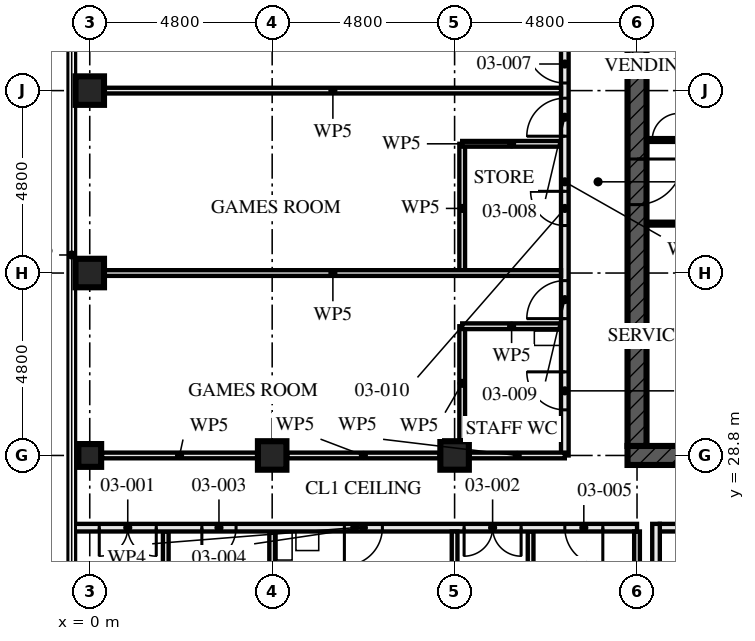
"""IFC4 building model, lengths in metres.
Left out: names, types, materials, properties, quantities, classifications, styles, units other than length and angle.
Written with IfcOpenShell. Run it as: python <this file> out.ifc"""

import sys

from ifc_helpers import new_model, si_unit, direction, frame, frame_2d, origin, origin_2d, place, context, subcontext, project, spatial, rectangle, hollow_rectangle, extrude, element, fill, save


model = new_model("IFC4")
c1 = context("Model", 3, precision=1e-05, world=origin(), true_north=direction((0.0, 1.0)))
c2 = subcontext(c1, "Body", "Model", "MODEL_VIEW")
j1 = project(units=[si_unit("LENGTHUNIT", "METRE"), si_unit("PLANEANGLEUNIT", "RADIAN")], contexts=[c1])
p1 = place(None, origin())
s1 = spatial("IfcSite", under=j1, at=p1, CompositionType="ELEMENT")
p2 = place(p1, origin())
s2 = spatial("IfcBuilding", under=s1, at=p2, CompositionType="ELEMENT")
p3 = place(p2, frame((0.0, 0.0, 13.5)))
s3 = spatial("IfcBuildingStorey", under=s2, at=p3, CompositionType="ELEMENT", Elevation=13.5)
p4 = place(p3, frame((0.0, 28.8, 0.0), z_axis=(0.0, 0.0, 1.0), x_axis=(0.0, 1.0, 0.0)))
e1 = element("IfcColumn", 1, at=p4, inside=s3, PredefinedType="COLUMN", context=c2, shape_type="SweptSolid", body=[
    extrude(hollow_rectangle(XDim=0.6, YDim=0.6, WallThickness=0.08, at=origin_2d()), origin(), (0.0, 0.0, 1.0), 4.5),
])
for number, where, z_axis, x_axis in (
    (2, (0.0, 33.6, 0.0), (0.0, 0.0, 1.0), (1.0, 0.0, 0.0)),
    (3, (0.0, 38.4, 0.0), (0.0, 0.0, 1.0), (1.0, 0.0, 0.0)),
    (4, (4.8, 28.8, 0.0), (0.0, 0.0, 1.0), (0.0, 1.0, 0.0)),
    (5, (9.6, 28.8, 0.0), (0.0, 0.0, 1.0), (0.0, 1.0, 0.0)),
):
    element("IfcColumn", number, at=place(p3, frame(where, z_axis=z_axis, x_axis=x_axis)), inside=s3, PredefinedType="COLUMN", context=c2, shape_type="SweptSolid", body=[
        extrude(hollow_rectangle(XDim=0.75, YDim=0.75, WallThickness=0.08, at=origin_2d()), origin(), (0.0, 0.0, 1.0), 4.5),
    ])
p5 = place(p3, frame((14.15, 28.8, -0.17), z_axis=(0.0, 0.0, 1.0), x_axis=(1.0, 0.0, 0.0)))
e6 = element("IfcWall", 6, at=p5, inside=s3, PredefinedType="SHEAR", context=c2, shape_type="SweptSolid", body=[
    extrude(rectangle(XDim=14.9, YDim=0.5, at=frame_2d((7.45, 0.0))), origin(), (0.0, 0.0, 1.0), 4.5),
])
p6 = place(p5, frame((6.85, 0.0, 0.17)))
e7 = element("IfcOpeningElement", 7, at=p6, cuts=e6, PredefinedType="OPENING", context=c2, shape_type="SweptSolid", body=[
    extrude(rectangle(XDim=1.2, YDim=2.1, at=frame_2d((0.6, 1.05))), frame((0.0, 0.26, 0.0), z_axis=(0.0, -1.0, 0.0), x_axis=(1.0, 0.0, 0.0)), (0.0, 0.0, 1.0), 0.521),
])
p7 = place(p3, frame((14.4, 42.95, -0.17), z_axis=(0.0, 0.0, 1.0), x_axis=(0.0, -1.0, 0.0)))
e8 = element("IfcWall", 8, at=p7, inside=s3, PredefinedType="SHEAR", context=c2, shape_type="SweptSolid", body=[
    extrude(rectangle(XDim=13.9, YDim=0.5, at=frame_2d((6.95, 0.0))), origin(), (0.0, 0.0, 1.0), 4.5),
])
p8 = place(p7, frame((6.35, 0.0, 0.17)))
e9 = element("IfcOpeningElement", 9, at=p8, cuts=e8, PredefinedType="OPENING", context=c2, shape_type="SweptSolid", body=[
    extrude(rectangle(XDim=1.2, YDim=2.1, at=frame_2d((0.6, 1.05))), frame((0.0, 0.26, 0.0), z_axis=(0.0, -1.0, 0.0), x_axis=(1.0, 0.0, 0.0)), (0.0, 0.0, 1.0), 0.521),
])
for number, where, z_axis, x_axis in (
    (10, (9.6, 23.8, 0.0), (0.0, 0.0, 1.0), (0.0, 1.0, 0.0)),
    (11, (2.0, 23.8, 0.0), (0.0, 0.0, 1.0), (0.0, 1.0, 0.0)),
    (12, (4.8, 23.8, 0.0), (0.0, 0.0, 1.0), (0.0, 1.0, 0.0)),
    (13, (11.6, 23.8, 0.0), (0.0, 0.0, 1.0), (0.0, 1.0, 0.0)),
):
    element("IfcWall", number, at=place(p3, frame(where, z_axis=z_axis, x_axis=x_axis)), inside=s3, PredefinedType="PARTITIONING", context=c2, shape_type="SweptSolid", body=[
        extrude(rectangle(XDim=3.0, YDim=0.15, at=frame_2d((1.5, 0.0))), origin(), (0.0, 0.0, 1.0), 3.55),
    ])
p9 = place(p3, frame((-0.455, 26.9, 0.0), z_axis=(0.0, 0.0, 1.0), x_axis=(1.0, 0.0, 0.0)))
e14 = element("IfcWall", 14, at=p9, inside=s3, PredefinedType="PARTITIONING", context=c2, shape_type="SweptSolid", body=[
    extrude(rectangle(XDim=14.855, YDim=0.2, at=frame_2d((7.427, 0.0))), origin(), (0.0, 0.0, 1.0), 3.32),
])
p10 = place(p9, frame((0.705, 0.0, 0.0)))
e15 = element("IfcOpeningElement", 15, at=p10, cuts=e14, PredefinedType="OPENING", context=c2, shape_type="SweptSolid", body=[
    extrude(rectangle(XDim=1.5, YDim=2.1, at=frame_2d((0.75, 1.05))), frame((0.0, 0.111, 0.0), z_axis=(0.0, -1.0, 0.0), x_axis=(1.0, 0.0, 0.0)), (0.0, 0.0, 1.0), 0.221),
])
p11 = place(p9, frame((10.305, 0.0, 0.0)))
e16 = element("IfcOpeningElement", 16, at=p11, cuts=e14, PredefinedType="OPENING", context=c2, shape_type="SweptSolid", body=[
    extrude(rectangle(XDim=1.5, YDim=2.1, at=frame_2d((0.75, 1.05))), frame((0.0, 0.111, 0.0), z_axis=(0.0, -1.0, 0.0), x_axis=(1.0, 0.0, 0.0)), (0.0, 0.0, 1.0), 0.221),
])
p12 = place(p9, frame((3.405, 0.0, 0.0)))
e17 = element("IfcOpeningElement", 17, at=p12, cuts=e14, PredefinedType="OPENING", context=c2, shape_type="SweptSolid", body=[
    extrude(rectangle(XDim=0.9, YDim=2.1, at=frame_2d((0.45, 1.05))), frame((0.0, 0.111, 0.0), z_axis=(0.0, -1.0, 0.0), x_axis=(1.0, 0.0, 0.0)), (0.0, 0.0, 1.0), 0.221),
])
p13 = place(p9, frame((7.155, 0.0, 0.0)))
e18 = element("IfcOpeningElement", 18, at=p13, cuts=e14, PredefinedType="OPENING", context=c2, shape_type="SweptSolid", body=[
    extrude(rectangle(XDim=1.0, YDim=2.1, at=frame_2d((0.5, 1.05))), frame((0.0, 0.111, 0.0), z_axis=(0.0, -1.0, 0.0), x_axis=(1.0, 0.0, 0.0)), (0.0, 0.0, 1.0), 0.221),
])
p14 = place(p9, frame((12.955, 0.0, 0.0)))
e19 = element("IfcOpeningElement", 19, at=p14, cuts=e14, PredefinedType="OPENING", context=c2, shape_type="SweptSolid", body=[
    extrude(rectangle(XDim=1.0, YDim=2.1, at=frame_2d((0.5, 1.05))), frame((0.0, 0.111, 0.0), z_axis=(0.0, -1.0, 0.0), x_axis=(1.0, 0.0, 0.0)), (0.0, 0.0, 1.0), 0.221),
])
p15 = place(p3, frame((9.8, 37.0, 0.0), z_axis=(0.0, 0.0, 1.0), x_axis=(1.0, 0.0, 0.0)))
e20 = element("IfcWall", 20, at=p15, inside=s3, PredefinedType="PARTITIONING", context=c2, shape_type="SweptSolid", body=[
    extrude(rectangle(XDim=2.6, YDim=0.15, at=frame_2d((1.3, 0.0))), origin(), (0.0, 0.0, 1.0), 4.33),
])
p16 = place(p3, frame((9.8, 37.0, 0.0), z_axis=(0.0, 0.0, 1.0), x_axis=(0.0, -1.0, 0.0)))
e21 = element("IfcWall", 21, at=p16, inside=s3, PredefinedType="PARTITIONING", context=c2, shape_type="SweptSolid", body=[
    extrude(rectangle(XDim=3.4, YDim=0.15, at=frame_2d((1.7, 0.0))), origin(), (0.0, 0.0, 1.0), 4.33),
])
p17 = place(p3, frame((9.8, 32.2, 0.0), z_axis=(0.0, 0.0, 1.0), x_axis=(1.0, 0.0, 0.0)))
e22 = element("IfcWall", 22, at=p17, inside=s3, PredefinedType="PARTITIONING", context=c2, shape_type="SweptSolid", body=[
    extrude(rectangle(XDim=2.6, YDim=0.15, at=frame_2d((1.3, 0.0))), origin(), (0.0, 0.0, 1.0), 4.33),
])
p18 = place(p3, frame((9.8, 32.2, 0.0), z_axis=(0.0, 0.0, 1.0), x_axis=(0.0, -1.0, 0.0)))
e23 = element("IfcWall", 23, at=p18, inside=s3, PredefinedType="PARTITIONING", context=c2, shape_type="SweptSolid", body=[
    extrude(rectangle(XDim=3.005, YDim=0.15, at=frame_2d((1.502, 0.0))), origin(), (0.0, 0.0, 1.0), 4.33),
])
for number, where, z_axis, x_axis in (
    (24, (0.395, 38.4, 0.0), (0.0, 0.0, 1.0), (1.0, 0.0, 0.0)),
    (25, (0.395, 33.6, 0.0), (0.0, 0.0, 1.0), (1.0, 0.0, 0.0)),
):
    element("IfcWall", number, at=place(p3, frame(where, z_axis=z_axis, x_axis=x_axis)), inside=s3, PredefinedType="PARTITIONING", context=c2, shape_type="SweptSolid", body=[
        extrude(rectangle(XDim=12.005, YDim=0.15, at=frame_2d((6.002, 0.0))), origin(), (0.0, 0.0, 1.0), 3.55),
    ])
p19 = place(p3, frame((12.5, 43.2, 0.0), z_axis=(0.0, 0.0, 1.0), x_axis=(0.0, -1.0, 0.0)))
e26 = element("IfcWall", 26, at=p19, inside=s3, PredefinedType="PARTITIONING", context=c2, shape_type="SweptSolid", body=[
    extrude(rectangle(XDim=14.4, YDim=0.2, at=frame_2d((7.2, 0.0))), origin(), (0.0, 0.0, 1.0), 3.55),
])
p20 = place(p19, frame((1.4, 0.0, 0.0)))
e27 = element("IfcOpeningElement", 27, at=p20, cuts=e26, PredefinedType="OPENING", context=c2, shape_type="SweptSolid", body=[
    extrude(rectangle(XDim=1.0, YDim=2.1, at=frame_2d((0.5, 1.05))), frame((0.0, 0.111, 0.0), z_axis=(0.0, -1.0, 0.0), x_axis=(1.0, 0.0, 0.0)), (0.0, 0.0, 1.0), 0.221),
])
p21 = place(p19, frame((3.6, 0.0, 0.0)))
e28 = element("IfcOpeningElement", 28, at=p21, cuts=e26, PredefinedType="OPENING", context=c2, shape_type="SweptSolid", body=[
    extrude(rectangle(XDim=1.0, YDim=2.4, at=frame_2d((0.5, 1.2))), frame((0.0, 0.111, 0.0), z_axis=(0.0, -1.0, 0.0), x_axis=(1.0, 0.0, 0.0)), (0.0, 0.0, 1.0), 0.221),
])
p22 = place(p19, frame((5.0, 0.0, 0.0)))
e29 = element("IfcOpeningElement", 29, at=p22, cuts=e26, PredefinedType="OPENING", context=c2, shape_type="SweptSolid", body=[
    extrude(rectangle(XDim=1.0, YDim=2.4, at=frame_2d((0.5, 1.2))), frame((0.0, 0.111, 0.0), z_axis=(0.0, -1.0, 0.0), x_axis=(1.0, 0.0, 0.0)), (0.0, 0.0, 1.0), 0.221),
])
p23 = place(p19, frame((9.8, 0.0, 0.0)))
e30 = element("IfcOpeningElement", 30, at=p23, cuts=e26, PredefinedType="OPENING", context=c2, shape_type="SweptSolid", body=[
    extrude(rectangle(XDim=1.0, YDim=2.4, at=frame_2d((0.5, 1.2))), frame((0.0, 0.111, 0.0), z_axis=(0.0, -1.0, 0.0), x_axis=(1.0, 0.0, 0.0)), (0.0, 0.0, 1.0), 0.221),
])
p24 = place(p19, frame((7.45, 0.0, 0.0)))
e31 = element("IfcOpeningElement", 31, at=p24, cuts=e26, PredefinedType="OPENING", context=c2, shape_type="SweptSolid", body=[
    extrude(rectangle(XDim=0.9, YDim=2.1, at=frame_2d((0.45, 1.05))), frame((0.0, 0.111, 0.0), z_axis=(0.0, -1.0, 0.0), x_axis=(1.0, 0.0, 0.0)), (0.0, 0.0, 1.0), 0.221),
])
p25 = place(p19, frame((12.2, 0.0, 0.0)))
e32 = element("IfcOpeningElement", 32, at=p25, cuts=e26, PredefinedType="OPENING", context=c2, shape_type="SweptSolid", body=[
    extrude(rectangle(XDim=1.0, YDim=2.1, at=frame_2d((0.5, 1.05))), frame((0.0, 0.111, 0.0), z_axis=(0.0, -1.0, 0.0), x_axis=(1.0, 0.0, 0.0)), (0.0, 0.0, 1.0), 0.221),
])
p26 = place(p3, frame((14.9, 22.1, 0.0), z_axis=(0.0, 0.0, 1.0), x_axis=(0.0, 1.0, 0.0)))
e33 = element("IfcWall", 33, at=p26, inside=s3, PredefinedType="SOLIDWALL", context=c2, shape_type="SweptSolid", body=[
    extrude(rectangle(XDim=4.9, YDim=0.2, at=frame_2d((2.45, 0.0))), origin(), (0.0, 0.0, 1.0), 3.99),
])
p27 = place(p3, frame((15.0, 26.9, 0.0), z_axis=(0.0, 0.0, 1.0), x_axis=(1.0, 0.0, 0.0)))
e34 = element("IfcWall", 34, at=p27, inside=s3, PredefinedType="SOLIDWALL", context=c2, shape_type="SweptSolid", body=[
    extrude(rectangle(XDim=2.6, YDim=0.2, at=frame_2d((1.3, 0.0))), origin(), (0.0, 0.0, 1.0), 4.33),
])
p28 = place(p27, frame((0.8, 0.0, 0.0)))
e35 = element("IfcOpeningElement", 35, at=p28, cuts=e34, PredefinedType="OPENING", context=c2, shape_type="SweptSolid", body=[
    extrude(rectangle(XDim=1.0, YDim=2.1, at=frame_2d((0.5, 1.05))), frame((0.0, 0.111, 0.0), z_axis=(0.0, -1.0, 0.0), x_axis=(1.0, 0.0, 0.0)), (0.0, 0.0, 1.0), 0.221),
])
p29 = place(p3, frame((14.65, 34.9, 0.0), z_axis=(0.0, 0.0, 1.0), x_axis=(1.0, 0.0, 0.0)))
e36 = element("IfcWall", 36, at=p29, inside=s3, PredefinedType="SOLIDWALL", context=c2, shape_type="SweptSolid", body=[
    extrude(rectangle(XDim=5.9, YDim=0.1, at=frame_2d((2.95, 0.0))), origin(), (0.0, 0.0, 1.0), 4.33),
])
p30 = place(p29, frame((1.6, 0.0, 0.0)))
e37 = element("IfcOpeningElement", 37, at=p30, cuts=e36, PredefinedType="OPENING", context=c2, shape_type="SweptSolid", body=[
    extrude(rectangle(XDim=0.7, YDim=2.1, at=frame_2d((0.35, 1.05))), frame((0.0, 0.061, 0.0), z_axis=(0.0, -1.0, 0.0), x_axis=(1.0, 0.0, 0.0)), (0.0, 0.0, 1.0), 0.121),
])
p31 = place(p3, frame((14.65, 37.1, 0.0), z_axis=(0.0, 0.0, 1.0), x_axis=(1.0, 0.0, 0.0)))
e38 = element("IfcWall", 38, at=p31, inside=s3, PredefinedType="SOLIDWALL", context=c2, shape_type="SweptSolid", body=[
    extrude(rectangle(XDim=5.9, YDim=0.1, at=frame_2d((2.95, 0.0))), origin(), (0.0, 0.0, 1.0), 4.33),
])
p32 = place(p31, frame((0.15, 0.0, 0.0)))
e39 = element("IfcOpeningElement", 39, at=p32, cuts=e38, PredefinedType="OPENING", context=c2, shape_type="SweptSolid", body=[
    extrude(rectangle(XDim=0.7, YDim=2.1, at=frame_2d((0.35, 1.05))), frame((0.0, 0.061, 0.0), z_axis=(0.0, -1.0, 0.0), x_axis=(1.0, 0.0, 0.0)), (0.0, 0.0, 1.0), 0.121),
])
p33 = place(p31, frame((1.5, 0.0, 0.0)))
e40 = element("IfcOpeningElement", 40, at=p33, cuts=e38, PredefinedType="OPENING", context=c2, shape_type="SweptSolid", body=[
    extrude(rectangle(XDim=0.9, YDim=2.1, at=frame_2d((0.45, 1.05))), frame((0.0, 0.061, 0.0), z_axis=(0.0, -1.0, 0.0), x_axis=(1.0, 0.0, 0.0)), (0.0, 0.0, 1.0), 0.121),
])
p34 = place(p3, frame((12.5, 28.8, 0.0), z_axis=(0.0, 0.0, 1.0), x_axis=(-1.0, 0.0, 0.0)))
e41 = element("IfcWall", 41, at=p34, inside=s3, PredefinedType="PARTITIONING", context=c2, shape_type="SweptSolid", body=[
    extrude(rectangle(XDim=2.505, YDim=0.15, at=frame_2d((1.252, 0.0))), origin(), (0.0, 0.0, 1.0), 3.32),
])
p35 = place(p3, frame((9.205, 28.8, 0.0), z_axis=(0.0, 0.0, 1.0), x_axis=(-1.0, 0.0, 0.0)))
e42 = element("IfcWall", 42, at=p35, inside=s3, PredefinedType="PARTITIONING", context=c2, shape_type="SweptSolid", body=[
    extrude(rectangle(XDim=4.01, YDim=0.15, at=frame_2d((2.005, 0.0))), origin(), (0.0, 0.0, 1.0), 3.32),
])
p36 = place(p3, frame((4.405, 28.8, 0.0), z_axis=(0.0, 0.0, 1.0), x_axis=(-1.0, 0.0, 0.0)))
e43 = element("IfcWall", 43, at=p36, inside=s3, PredefinedType="PARTITIONING", context=c2, shape_type="SweptSolid", body=[
    extrude(rectangle(XDim=4.085, YDim=0.15, at=frame_2d((2.042, 0.0))), origin(), (0.0, 0.0, 1.0), 3.32),
])
p37 = place(p3, frame((14.4, 24.395, 0.0), z_axis=(0.0, 0.0, 1.0), x_axis=(0.0, 1.0, 0.0)))
e44 = element("IfcWall", 44, at=p37, inside=s3, PredefinedType="PARTITIONING", context=c2, shape_type="SweptSolid", body=[
    extrude(rectangle(XDim=2.405, YDim=0.15, at=frame_2d((1.203, 0.0))), origin(), (0.0, 0.0, 1.0), 3.32),
])
p38 = place(p10, frame((1.5, 0.0, 0.0), z_axis=(0.0, 0.0, 1.0), x_axis=(-1.0, 0.0, 0.0)))
e45 = element("IfcDoor", 45, at=p38, inside=s3, OperationType="DOUBLE_DOOR_SINGLE_SWING", PredefinedType="DOOR", context=c2, shape_type="SweptSolid", body=[
    extrude(rectangle(XDim=1.5, YDim=2.1, at=frame_2d((0.75, 1.05))), frame((0.0, 0.027, 0.0), z_axis=(0.0, -1.0, 0.0), x_axis=(1.0, 0.0, 0.0)), (0.0, 0.0, 1.0), 0.054),
])
fill(e15, e45)
p39 = place(p11, frame((1.5, 0.0, 0.0), z_axis=(0.0, 0.0, 1.0), x_axis=(-1.0, 0.0, 0.0)))
e46 = element("IfcDoor", 46, at=p39, inside=s3, OperationType="DOUBLE_DOOR_SINGLE_SWING", PredefinedType="DOOR", context=c2, shape_type="SweptSolid", body=[
    extrude(rectangle(XDim=1.5, YDim=2.1, at=frame_2d((0.75, 1.05))), frame((0.0, 0.027, 0.0), z_axis=(0.0, -1.0, 0.0), x_axis=(1.0, 0.0, 0.0)), (0.0, 0.0, 1.0), 0.054),
])
fill(e16, e46)
p40 = place(p12, frame((0.9, 0.0, 0.0), z_axis=(0.0, 0.0, 1.0), x_axis=(-1.0, 0.0, 0.0)))
e47 = element("IfcDoor", 47, at=p40, inside=s3, OperationType="SINGLE_SWING_LEFT", PredefinedType="DOOR", context=c2, shape_type="SweptSolid", body=[
    extrude(rectangle(XDim=0.9, YDim=2.1, at=frame_2d((0.45, 1.05))), frame((0.0, 0.027, 0.0), z_axis=(0.0, -1.0, 0.0), x_axis=(1.0, 0.0, 0.0)), (0.0, 0.0, 1.0), 0.054),
])
fill(e17, e47)
p41 = place(p13, frame((1.0, 0.0, 0.0), z_axis=(0.0, 0.0, 1.0), x_axis=(-1.0, 0.0, 0.0)))
e48 = element("IfcDoor", 48, at=p41, inside=s3, OperationType="SINGLE_SWING_LEFT", PredefinedType="DOOR", context=c2, shape_type="SweptSolid", body=[
    extrude(rectangle(XDim=1.0, YDim=2.1, at=frame_2d((0.5, 1.05))), frame((0.0, 0.027, 0.0), z_axis=(0.0, -1.0, 0.0), x_axis=(1.0, 0.0, 0.0)), (0.0, 0.0, 1.0), 0.054),
])
fill(e18, e48)
p42 = place(p14, frame((1.0, 0.0, 0.0), z_axis=(0.0, 0.0, 1.0), x_axis=(-1.0, 0.0, 0.0)))
e49 = element("IfcDoor", 49, at=p42, inside=s3, OperationType="SINGLE_SWING_RIGHT", PredefinedType="DOOR", context=c2, shape_type="SweptSolid", body=[
    extrude(rectangle(XDim=1.0, YDim=2.1, at=frame_2d((0.5, 1.05))), frame((0.0, 0.027, 0.0), z_axis=(0.0, -1.0, 0.0), x_axis=(1.0, 0.0, 0.0)), (0.0, 0.0, 1.0), 0.054),
])
fill(e19, e49)
p43 = place(p21, frame((1.0, 0.0, 0.0), z_axis=(0.0, 0.0, 1.0), x_axis=(-1.0, 0.0, 0.0)))
e50 = element("IfcDoor", 50, at=p43, inside=s3, OperationType="SINGLE_SWING_LEFT", PredefinedType="DOOR", context=c2, shape_type="SweptSolid", body=[
    extrude(rectangle(XDim=1.0, YDim=2.4, at=frame_2d((0.5, 1.2))), frame((0.0, 0.027, 0.0), z_axis=(0.0, -1.0, 0.0), x_axis=(1.0, 0.0, 0.0)), (0.0, 0.0, 1.0), 0.054),
])
fill(e28, e50)
p44 = place(p22, frame((1.0, 0.0, 0.0), z_axis=(0.0, 0.0, 1.0), x_axis=(-1.0, 0.0, 0.0)))
e51 = element("IfcDoor", 51, at=p44, inside=s3, OperationType="SINGLE_SWING_RIGHT", PredefinedType="DOOR", context=c2, shape_type="SweptSolid", body=[
    extrude(rectangle(XDim=1.0, YDim=2.4, at=frame_2d((0.5, 1.2))), frame((0.0, 0.027, 0.0), z_axis=(0.0, -1.0, 0.0), x_axis=(1.0, 0.0, 0.0)), (0.0, 0.0, 1.0), 0.054),
])
fill(e29, e51)
p45 = place(p23, frame((1.0, 0.0, 0.0), z_axis=(0.0, 0.0, 1.0), x_axis=(-1.0, 0.0, 0.0)))
e52 = element("IfcDoor", 52, at=p45, inside=s3, OperationType="SINGLE_SWING_RIGHT", PredefinedType="DOOR", context=c2, shape_type="SweptSolid", body=[
    extrude(rectangle(XDim=1.0, YDim=2.4, at=frame_2d((0.5, 1.2))), frame((0.0, 0.027, 0.0), z_axis=(0.0, -1.0, 0.0), x_axis=(1.0, 0.0, 0.0)), (0.0, 0.0, 1.0), 0.054),
])
fill(e30, e52)
p46 = place(p24, frame((0.9, 0.0, 0.0), z_axis=(0.0, 0.0, 1.0), x_axis=(-1.0, 0.0, 0.0)))
e53 = element("IfcDoor", 53, at=p46, inside=s3, OperationType="SINGLE_SWING_LEFT", PredefinedType="DOOR", context=c2, shape_type="SweptSolid", body=[
    extrude(rectangle(XDim=0.9, YDim=2.1, at=frame_2d((0.45, 1.05))), frame((0.0, 0.027, 0.0), z_axis=(0.0, -1.0, 0.0), x_axis=(1.0, 0.0, 0.0)), (0.0, 0.0, 1.0), 0.054),
])
fill(e31, e53)
p47 = place(p25, frame((1.0, 0.0, 0.0), z_axis=(0.0, 0.0, 1.0), x_axis=(-1.0, 0.0, 0.0)))
e54 = element("IfcDoor", 54, at=p47, inside=s3, OperationType="SINGLE_SWING_LEFT", PredefinedType="DOOR", context=c2, shape_type="SweptSolid", body=[
    extrude(rectangle(XDim=1.0, YDim=2.1, at=frame_2d((0.5, 1.05))), frame((0.0, 0.027, 0.0), z_axis=(0.0, -1.0, 0.0), x_axis=(1.0, 0.0, 0.0)), (0.0, 0.0, 1.0), 0.054),
])
fill(e32, e54)
p48 = place(p32, origin())
e55 = element("IfcDoor", 55, at=p48, inside=s3, OperationType="SINGLE_SWING_LEFT", PredefinedType="DOOR", context=c2, shape_type="SweptSolid", body=[
    extrude(rectangle(XDim=0.7, YDim=2.1, at=frame_2d((0.35, 1.05))), frame((0.0, 0.027, 0.0), z_axis=(0.0, -1.0, 0.0), x_axis=(1.0, 0.0, 0.0)), (0.0, 0.0, 1.0), 0.054),
])
fill(e39, e55)
p49 = place(p8, origin())
e56 = element("IfcDoor", 56, at=p49, inside=s3, OperationType="SINGLE_SWING_LEFT", PredefinedType="DOOR", context=c2, shape_type="SweptSolid", body=[
    extrude(rectangle(XDim=1.2, YDim=2.1, at=frame_2d((0.6, 1.05))), frame((0.0, 0.027, 0.0), z_axis=(0.0, -1.0, 0.0), x_axis=(1.0, 0.0, 0.0)), (0.0, 0.0, 1.0), 0.054),
])
fill(e9, e56)
save(model, sys.argv[1])
